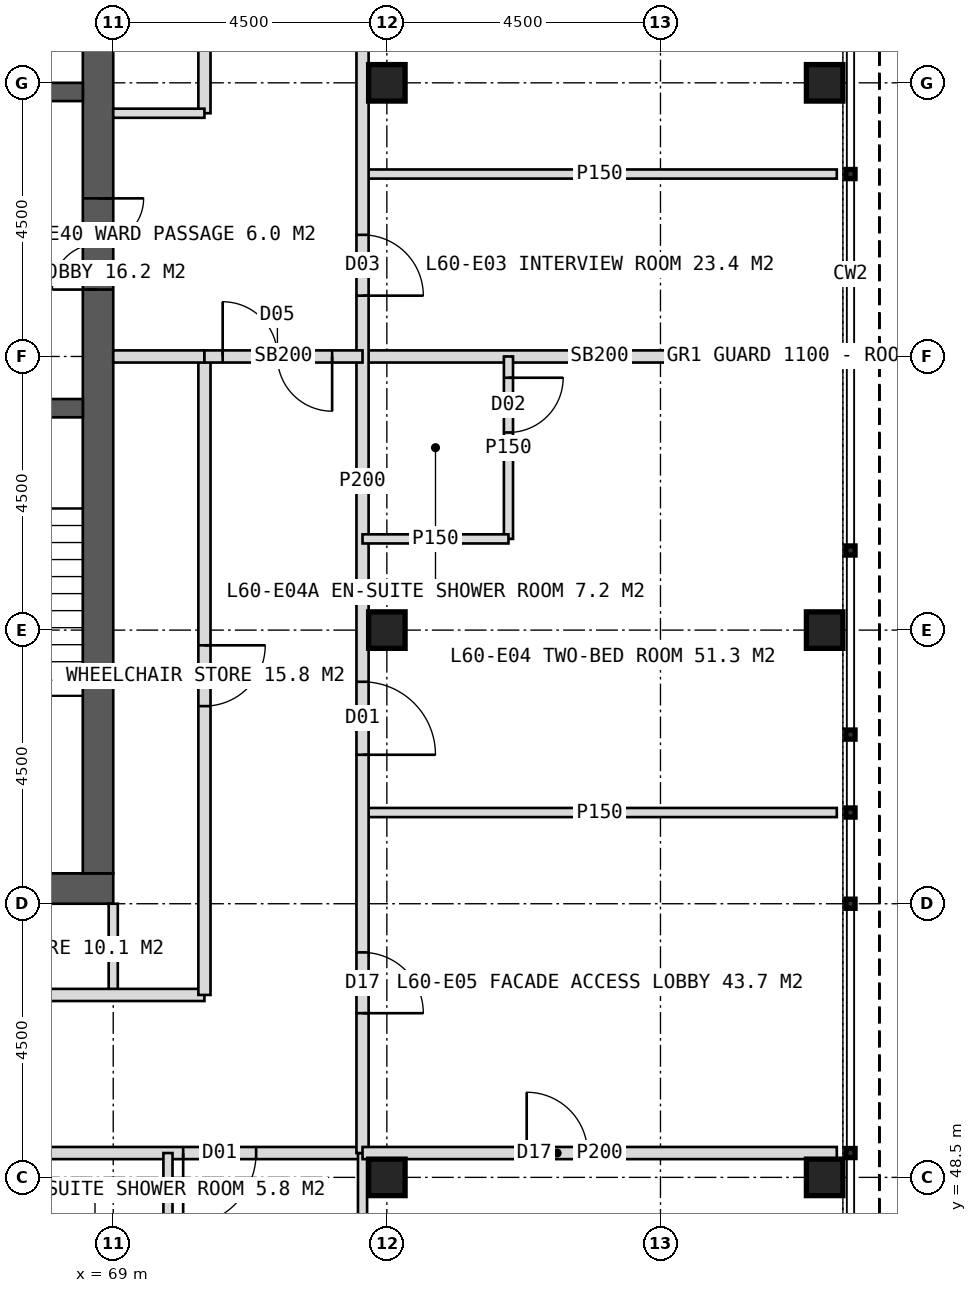
"""IFC4 building model, lengths in metres.
Left out: names, types, materials, properties, quantities, classifications, styles, units other than length and angle.
Written with IfcOpenShell. Run it as: python <this file> out.ifc"""

import sys

from ifc_helpers import new_model, si_unit, direction, frame, frame_2d, origin, origin_2d, place, context, subcontext, project, spatial, rectangle, hollow_rectangle, extrude, element, fill, save


model = new_model("IFC4")
c1 = context("Model", 3, precision=1e-05, world=origin(), true_north=direction((0.0, 1.0)))
c2 = subcontext(c1, "Body", "Model", "MODEL_VIEW")
j1 = project(units=[si_unit("LENGTHUNIT", "METRE"), si_unit("PLANEANGLEUNIT", "RADIAN")], contexts=[c1])
p1 = place(None, origin())
s1 = spatial("IfcSite", under=j1, at=p1, CompositionType="ELEMENT")
p2 = place(p1, origin())
s2 = spatial("IfcBuilding", under=s1, at=p2, CompositionType="ELEMENT")
p3 = place(p2, frame((0.0, 0.0, 250.0)))
s3 = spatial("IfcBuildingStorey", under=s2, at=p3, CompositionType="ELEMENT", Elevation=250.0)
p4 = place(p3, frame((51.0, 53.25, 0.0), z_axis=(0.0, 0.0, 1.0), x_axis=(1.0, 0.0, 0.0)))
e1 = element("IfcWall", 1, at=p4, inside=s3, PredefinedType="SHEAR", context=c2, shape_type="SweptSolid", body=[
    extrude(rectangle(XDim=18.0, YDim=0.5, at=frame_2d((9.0, 0.0))), origin(), (0.0, 0.0, 1.0), 4.0),
])
p5 = place(p4, frame((8.1, 0.0, 0.0)))
e2 = element("IfcOpeningElement", 2, at=p5, cuts=e1, PredefinedType="OPENING", context=c2, shape_type="SweptSolid", body=[
    extrude(rectangle(XDim=1.8, YDim=2.2, at=frame_2d((0.9, 1.1))), frame((0.0, 0.26, 0.0), z_axis=(0.0, -1.0, 0.0), x_axis=(1.0, 0.0, 0.0)), (0.0, 0.0, 1.0), 0.52),
])
p6 = place(p3, frame((68.75, 53.5, 0.0), z_axis=(0.0, 0.0, 1.0), x_axis=(0.0, 1.0, 0.0)))
e3 = element("IfcWall", 3, at=p6, inside=s3, PredefinedType="SHEAR", context=c2, shape_type="SweptSolid", body=[
    extrude(rectangle(XDim=17.0, YDim=0.5, at=frame_2d((8.5, 0.0))), origin(), (0.0, 0.0, 1.0), 4.0),
])
p7 = place(p6, frame((9.6, 0.0, 0.0)))
e4 = element("IfcOpeningElement", 4, at=p7, cuts=e3, PredefinedType="OPENING", context=c2, shape_type="SweptSolid", body=[
    extrude(rectangle(XDim=1.5, YDim=2.2, at=frame_2d((0.75, 1.1))), frame((0.0, 0.26, 0.0), z_axis=(0.0, -1.0, 0.0), x_axis=(1.0, 0.0, 0.0)), (0.0, 0.0, 1.0), 0.52),
])
p8 = place(p3, frame((65.2, 61.15, 0.0), z_axis=(0.0, 0.0, 1.0), x_axis=(1.0, 0.0, 0.0)))
e5 = element("IfcWall", 5, at=p8, inside=s3, PredefinedType="SHEAR", context=c2, shape_type="SweptSolid", body=[
    extrude(rectangle(XDim=3.3, YDim=0.3, at=frame_2d((1.65, 0.0))), origin(), (0.0, 0.0, 1.0), 4.0),
])
p9 = place(p8, frame((1.05, 0.0, 0.0)))
e6 = element("IfcOpeningElement", 6, at=p9, cuts=e5, PredefinedType="OPENING", context=c2, shape_type="SweptSolid", body=[
    extrude(rectangle(XDim=1.2, YDim=2.1, at=frame_2d((0.6, 1.05))), frame((0.0, 0.16, 0.0), z_axis=(0.0, -1.0, 0.0), x_axis=(1.0, 0.0, 0.0)), (0.0, 0.0, 1.0), 0.32),
])
p10 = place(p3, frame((65.2, 66.35, 0.0), z_axis=(0.0, 0.0, 1.0), x_axis=(1.0, 0.0, 0.0)))
e7 = element("IfcWall", 7, at=p10, inside=s3, PredefinedType="SHEAR", context=c2, shape_type="SweptSolid", body=[
    extrude(rectangle(XDim=3.3, YDim=0.3, at=frame_2d((1.65, 0.0))), origin(), (0.0, 0.0, 1.0), 4.0),
])
p11 = place(p10, frame((1.05, 0.0, 0.0)))
e8 = element("IfcOpeningElement", 8, at=p11, cuts=e7, PredefinedType="OPENING", context=c2, shape_type="SweptSolid", body=[
    extrude(rectangle(XDim=1.2, YDim=2.2, at=frame_2d((0.6, 1.1))), frame((0.0, 0.16, 0.0), z_axis=(0.0, -1.0, 0.0), x_axis=(1.0, 0.0, 0.0)), (0.0, 0.0, 1.0), 0.32),
])
for number, where, z_axis, x_axis in (
    (9, (73.5, 48.5, 0.0), (0.0, 0.0, 1.0), (1.0, 0.0, 0.0)),
    (10, (73.5, 57.5, 0.0), (0.0, 0.0, 1.0), (1.0, 0.0, 0.0)),
    (11, (73.5, 66.5, 0.0), (0.0, 0.0, 1.0), (1.0, 0.0, 0.0)),
    (12, (80.7, 48.5, 0.0), (0.0, 0.0, 1.0), (1.0, 0.0, 0.0)),
    (13, (80.7, 57.5, 0.0), (0.0, 0.0, 1.0), (1.0, 0.0, 0.0)),
    (14, (80.7, 66.5, 0.0), (0.0, 0.0, 1.0), (1.0, 0.0, 0.0)),
):
    element("IfcColumn", number, at=place(p3, frame(where, z_axis=z_axis, x_axis=x_axis)), inside=s3, PredefinedType="COLUMN", context=c2, shape_type="SweptSolid", body=[
        extrude(hollow_rectangle(XDim=0.6, YDim=0.6, WallThickness=0.04, at=origin_2d()), origin(), (0.0, 0.0, 1.0), 4.0),
    ])
p12 = place(p3, frame((73.1, 48.9, 0.0), z_axis=(0.0, 0.0, 1.0), x_axis=(-1.0, 0.0, 0.0)))
e15 = element("IfcWall", 15, at=p12, inside=s3, PredefinedType="PARTITIONING", context=c2, shape_type="SweptSolid", body=[
    extrude(rectangle(XDim=26.2, YDim=0.2, at=frame_2d((13.1, 0.0))), origin(), (0.0, 0.0, 1.0), 3.75),
])
p13 = place(p12, frame((1.75, 0.0, 0.0)))
e16 = element("IfcOpeningElement", 16, at=p13, cuts=e15, PredefinedType="OPENING", context=c2, shape_type="SweptSolid", body=[
    extrude(rectangle(XDim=1.2, YDim=2.2, at=frame_2d((0.6, 1.1))), frame((0.0, 0.11, 0.0), z_axis=(0.0, -1.0, 0.0), x_axis=(1.0, 0.0, 0.0)), (0.0, 0.0, 1.0), 0.22),
])
p14 = place(p12, frame((6.75, 0.0, 0.0)))
e17 = element("IfcOpeningElement", 17, at=p14, cuts=e15, PredefinedType="OPENING", context=c2, shape_type="SweptSolid", body=[
    extrude(rectangle(XDim=1.0, YDim=2.1, at=frame_2d((0.5, 1.05))), frame((0.0, 0.11, 0.0), z_axis=(0.0, -1.0, 0.0), x_axis=(1.0, 0.0, 0.0)), (0.0, 0.0, 1.0), 0.22),
])
p15 = place(p12, frame((11.1, 0.0, 0.0)))
e18 = element("IfcOpeningElement", 18, at=p15, cuts=e15, PredefinedType="OPENING", context=c2, shape_type="SweptSolid", body=[
    extrude(rectangle(XDim=1.0, YDim=2.1, at=frame_2d((0.5, 1.05))), frame((0.0, 0.11, 0.0), z_axis=(0.0, -1.0, 0.0), x_axis=(1.0, 0.0, 0.0)), (0.0, 0.0, 1.0), 0.22),
])
p16 = place(p12, frame((14.1, 0.0, 0.0)))
e19 = element("IfcOpeningElement", 19, at=p16, cuts=e15, PredefinedType="OPENING", context=c2, shape_type="SweptSolid", body=[
    extrude(rectangle(XDim=1.0, YDim=2.1, at=frame_2d((0.5, 1.05))), frame((0.0, 0.11, 0.0), z_axis=(0.0, -1.0, 0.0), x_axis=(1.0, 0.0, 0.0)), (0.0, 0.0, 1.0), 0.22),
])
p17 = place(p12, frame((18.45, 0.0, 0.0)))
e20 = element("IfcOpeningElement", 20, at=p17, cuts=e15, PredefinedType="OPENING", context=c2, shape_type="SweptSolid", body=[
    extrude(rectangle(XDim=1.0, YDim=2.1, at=frame_2d((0.5, 1.05))), frame((0.0, 0.11, 0.0), z_axis=(0.0, -1.0, 0.0), x_axis=(1.0, 0.0, 0.0)), (0.0, 0.0, 1.0), 0.22),
])
p18 = place(p12, frame((22.9, 0.0, 0.0)))
e21 = element("IfcOpeningElement", 21, at=p18, cuts=e15, PredefinedType="OPENING", context=c2, shape_type="SweptSolid", body=[
    extrude(rectangle(XDim=1.0, YDim=2.1, at=frame_2d((0.5, 1.05))), frame((0.0, 0.11, 0.0), z_axis=(0.0, -1.0, 0.0), x_axis=(1.0, 0.0, 0.0)), (0.0, 0.0, 1.0), 0.22),
])
p19 = place(p3, frame((73.1, 48.9, 0.0), z_axis=(0.0, 0.0, 1.0), x_axis=(0.0, -1.0, 0.0)))
e22 = element("IfcWall", 22, at=p19, inside=s3, PredefinedType="PARTITIONING", context=c2, shape_type="SweptSolid", body=[
    extrude(rectangle(XDim=7.8, YDim=0.15, at=frame_2d((3.9, 0.0))), origin(), (0.0, 0.0, 1.0), 3.75),
])
p20 = place(p3, frame((69.9, 48.9, 0.0), z_axis=(0.0, 0.0, 1.0), x_axis=(0.0, -1.0, 0.0)))
e23 = element("IfcWall", 23, at=p20, inside=s3, PredefinedType="PARTITIONING", context=c2, shape_type="SweptSolid", body=[
    extrude(rectangle(XDim=2.4, YDim=0.15, at=frame_2d((1.2, 0.0))), origin(), (0.0, 0.0, 1.0), 3.75),
])
p21 = place(p3, frame((69.0, 53.0, 0.0), z_axis=(0.0, 0.0, 1.0), x_axis=(0.0, -1.0, 0.0)))
e24 = element("IfcWall", 24, at=p21, inside=s3, PredefinedType="PARTITIONING", context=c2, shape_type="SweptSolid", body=[
    extrude(rectangle(XDim=1.5, YDim=0.15, at=frame_2d((0.75, 0.0))), origin(), (0.0, 0.0, 1.0), 3.75),
])
p22 = place(p3, frame((70.5, 51.5, 0.0), z_axis=(0.0, 0.0, 1.0), x_axis=(-1.0, 0.0, 0.0)))
e25 = element("IfcWall", 25, at=p22, inside=s3, PredefinedType="PARTITIONING", context=c2, shape_type="SweptSolid", body=[
    extrude(rectangle(XDim=8.25, YDim=0.2, at=frame_2d((4.125, 0.0))), origin(), (0.0, 0.0, 1.0), 3.75),
])
p23 = place(p22, frame((4.375, 0.0, 0.0)))
e26 = element("IfcOpeningElement", 26, at=p23, cuts=e25, PredefinedType="OPENING", context=c2, shape_type="SweptSolid", body=[
    extrude(rectangle(XDim=1.0, YDim=2.1, at=frame_2d((0.5, 1.05))), frame((0.0, 0.11, 0.0), z_axis=(0.0, -1.0, 0.0), x_axis=(1.0, 0.0, 0.0)), (0.0, 0.0, 1.0), 0.22),
])
p24 = place(p3, frame((73.1, 65.0, 0.0), z_axis=(0.0, 0.0, 1.0), x_axis=(1.0, 0.0, 0.0)))
e27 = element("IfcWall", 27, at=p24, inside=s3, PredefinedType="PARTITIONING", context=c2, shape_type="SweptSolid", body=[
    extrude(rectangle(XDim=7.8, YDim=0.15, at=frame_2d((3.9, 0.0))), origin(), (0.0, 0.0, 1.0), 3.75),
])
p25 = place(p3, frame((73.1, 62.0, 0.0), z_axis=(0.0, 0.0, 1.0), x_axis=(1.0, 0.0, 0.0)))
e28 = element("IfcWall", 28, at=p25, inside=s3, PredefinedType="SOLIDWALL", context=c2, shape_type="SweptSolid", body=[
    extrude(rectangle(XDim=7.8, YDim=0.2, at=frame_2d((3.9, 0.0))), origin(), (0.0, 0.0, 1.0), 2.75),
])
p26 = place(p3, frame((73.1, 54.5, 0.0), z_axis=(0.0, 0.0, 1.0), x_axis=(1.0, 0.0, 0.0)))
e29 = element("IfcWall", 29, at=p26, inside=s3, PredefinedType="PARTITIONING", context=c2, shape_type="SweptSolid", body=[
    extrude(rectangle(XDim=7.8, YDim=0.15, at=frame_2d((3.9, 0.0))), origin(), (0.0, 0.0, 1.0), 3.75),
])
p27 = place(p3, frame((73.1, 71.0, 0.0), z_axis=(0.0, 0.0, 1.0), x_axis=(0.0, -1.0, 0.0)))
e30 = element("IfcWall", 30, at=p27, inside=s3, PredefinedType="PARTITIONING", context=c2, shape_type="SweptSolid", body=[
    extrude(rectangle(XDim=22.1, YDim=0.2, at=frame_2d((11.05, 0.0))), origin(), (0.0, 0.0, 1.0), 3.75),
])
p28 = place(p27, frame((2.65, 0.0, 0.0)))
e31 = element("IfcOpeningElement", 31, at=p28, cuts=e30, PredefinedType="OPENING", context=c2, shape_type="SweptSolid", body=[
    extrude(rectangle(XDim=1.0, YDim=2.1, at=frame_2d((0.5, 1.05))), frame((0.0, 0.11, 0.0), z_axis=(0.0, -1.0, 0.0), x_axis=(1.0, 0.0, 0.0)), (0.0, 0.0, 1.0), 0.22),
])
p29 = place(p27, frame((7.0, 0.0, 0.0)))
e32 = element("IfcOpeningElement", 32, at=p29, cuts=e30, PredefinedType="OPENING", context=c2, shape_type="SweptSolid", body=[
    extrude(rectangle(XDim=1.0, YDim=2.1, at=frame_2d((0.5, 1.05))), frame((0.0, 0.11, 0.0), z_axis=(0.0, -1.0, 0.0), x_axis=(1.0, 0.0, 0.0)), (0.0, 0.0, 1.0), 0.22),
])
p30 = place(p27, frame((14.35, 0.0, 0.0)))
e33 = element("IfcOpeningElement", 33, at=p30, cuts=e30, PredefinedType="OPENING", context=c2, shape_type="SweptSolid", body=[
    extrude(rectangle(XDim=1.2, YDim=2.2, at=frame_2d((0.6, 1.1))), frame((0.0, 0.11, 0.0), z_axis=(0.0, -1.0, 0.0), x_axis=(1.0, 0.0, 0.0)), (0.0, 0.0, 1.0), 0.22),
])
p31 = place(p27, frame((18.8, 0.0, 0.0)))
e34 = element("IfcOpeningElement", 34, at=p31, cuts=e30, PredefinedType="OPENING", context=c2, shape_type="SweptSolid", body=[
    extrude(rectangle(XDim=1.0, YDim=2.1, at=frame_2d((0.5, 1.05))), frame((0.0, 0.11, 0.0), z_axis=(0.0, -1.0, 0.0), x_axis=(1.0, 0.0, 0.0)), (0.0, 0.0, 1.0), 0.22),
])
p32 = place(p3, frame((75.5, 62.0, 0.0), z_axis=(0.0, 0.0, 1.0), x_axis=(0.0, -1.0, 0.0)))
e35 = element("IfcWall", 35, at=p32, inside=s3, PredefinedType="PARTITIONING", context=c2, shape_type="SweptSolid", body=[
    extrude(rectangle(XDim=3.0, YDim=0.15, at=frame_2d((1.5, 0.0))), origin(), (0.0, 0.0, 1.0), 3.75),
])
p33 = place(p32, frame((0.35, 0.0, 0.0)))
e36 = element("IfcOpeningElement", 36, at=p33, cuts=e35, PredefinedType="OPENING", context=c2, shape_type="SweptSolid", body=[
    extrude(rectangle(XDim=0.9, YDim=2.1, at=frame_2d((0.45, 1.05))), frame((0.0, 0.085, 0.0), z_axis=(0.0, -1.0, 0.0), x_axis=(1.0, 0.0, 0.0)), (0.0, 0.0, 1.0), 0.17),
])
p34 = place(p3, frame((73.1, 59.0, 0.0), z_axis=(0.0, 0.0, 1.0), x_axis=(1.0, 0.0, 0.0)))
e37 = element("IfcWall", 37, at=p34, inside=s3, PredefinedType="PARTITIONING", context=c2, shape_type="SweptSolid", body=[
    extrude(rectangle(XDim=2.4, YDim=0.15, at=frame_2d((1.2, 0.0))), origin(), (0.0, 0.0, 1.0), 3.75),
])
p35 = place(p3, frame((73.1, 48.9, 0.0), z_axis=(0.0, 0.0, 1.0), x_axis=(1.0, 0.0, 0.0)))
e38 = element("IfcWall", 38, at=p35, inside=s3, PredefinedType="PARTITIONING", context=c2, shape_type="SweptSolid", body=[
    extrude(rectangle(XDim=7.8, YDim=0.2, at=frame_2d((3.9, 0.0))), origin(), (0.0, 0.0, 1.0), 3.75),
])
p36 = place(p35, frame((2.7, 0.0, 0.0)))
e39 = element("IfcOpeningElement", 39, at=p36, cuts=e38, PredefinedType="OPENING", context=c2, shape_type="SweptSolid", body=[
    extrude(rectangle(XDim=1.0, YDim=2.1, at=frame_2d((0.5, 1.05))), frame((0.0, 0.11, 0.0), z_axis=(0.0, -1.0, 0.0), x_axis=(1.0, 0.0, 0.0)), (0.0, 0.0, 1.0), 0.22),
])
p37 = place(p3, frame((70.5, 72.5, 0.0), z_axis=(0.0, 0.0, 1.0), x_axis=(0.0, -1.0, 0.0)))
e40 = element("IfcWall", 40, at=p37, inside=s3, PredefinedType="PARTITIONING", context=c2, shape_type="SweptSolid", body=[
    extrude(rectangle(XDim=6.5, YDim=0.2, at=frame_2d((3.25, 0.0))), origin(), (0.0, 0.0, 1.0), 3.75),
])
p38 = place(p37, frame((3.5, 0.0, 0.0)))
e41 = element("IfcOpeningElement", 41, at=p38, cuts=e40, PredefinedType="OPENING", context=c2, shape_type="SweptSolid", body=[
    extrude(rectangle(XDim=1.0, YDim=2.1, at=frame_2d((0.5, 1.05))), frame((0.0, 0.11, 0.0), z_axis=(0.0, -1.0, 0.0), x_axis=(1.0, 0.0, 0.0)), (0.0, 0.0, 1.0), 0.22),
])
p39 = place(p3, frame((70.5, 62.0, 0.0), z_axis=(0.0, 0.0, 1.0), x_axis=(0.0, -1.0, 0.0)))
e42 = element("IfcWall", 42, at=p39, inside=s3, PredefinedType="PARTITIONING", context=c2, shape_type="SweptSolid", body=[
    extrude(rectangle(XDim=10.5, YDim=0.2, at=frame_2d((5.25, 0.0))), origin(), (0.0, 0.0, 1.0), 3.75),
])
p40 = place(p39, frame((4.75, 0.0, 0.0)))
e43 = element("IfcOpeningElement", 43, at=p40, cuts=e42, PredefinedType="OPENING", context=c2, shape_type="SweptSolid", body=[
    extrude(rectangle(XDim=1.0, YDim=2.1, at=frame_2d((0.5, 1.05))), frame((0.0, 0.11, 0.0), z_axis=(0.0, -1.0, 0.0), x_axis=(1.0, 0.0, 0.0)), (0.0, 0.0, 1.0), 0.22),
])
p41 = place(p3, frame((69.0, 66.0, 0.0), z_axis=(0.0, 0.0, 1.0), x_axis=(1.0, 0.0, 0.0)))
e44 = element("IfcWall", 44, at=p41, inside=s3, PredefinedType="PARTITIONING", context=c2, shape_type="SweptSolid", body=[
    extrude(rectangle(XDim=1.5, YDim=0.15, at=frame_2d((0.75, 0.0))), origin(), (0.0, 0.0, 1.0), 3.75),
])
p42 = place(p3, frame((69.0, 62.0, 0.0), z_axis=(0.0, 0.0, 1.0), x_axis=(1.0, 0.0, 0.0)))
e45 = element("IfcWall", 45, at=p42, inside=s3, PredefinedType="SOLIDWALL", context=c2, shape_type="SweptSolid", body=[
    extrude(rectangle(XDim=1.5, YDim=0.2, at=frame_2d((0.75, 0.0))), origin(), (0.0, 0.0, 1.0), 2.75),
])
p43 = place(p3, frame((70.5, 62.0, 0.0), z_axis=(0.0, 0.0, 1.0), x_axis=(1.0, 0.0, 0.0)))
e46 = element("IfcWall", 46, at=p43, inside=s3, PredefinedType="SOLIDWALL", context=c2, shape_type="SweptSolid", body=[
    extrude(rectangle(XDim=2.6, YDim=0.2, at=frame_2d((1.3, 0.0))), origin(), (0.0, 0.0, 1.0), 2.75),
])
p44 = place(p43, frame((0.3, 0.0, 0.0)))
e47 = element("IfcOpeningElement", 47, at=p44, cuts=e46, PredefinedType="OPENING", context=c2, shape_type="SweptSolid", body=[
    extrude(rectangle(XDim=1.8, YDim=2.2, at=frame_2d((0.9, 1.1))), frame((0.0, 0.11, 0.0), z_axis=(0.0, -1.0, 0.0), x_axis=(1.0, 0.0, 0.0)), (0.0, 0.0, 1.0), 0.22),
])
p45 = place(p13, origin())
e48 = element("IfcDoor", 48, at=p45, inside=s3, OperationType="SINGLE_SWING_RIGHT", PredefinedType="DOOR", context=c2, shape_type="SweptSolid", body=[
    extrude(rectangle(XDim=1.2, YDim=2.2, at=frame_2d((0.6, 1.1))), frame((0.0, 0.025, 0.0), z_axis=(0.0, -1.0, 0.0), x_axis=(1.0, 0.0, 0.0)), (0.0, 0.0, 1.0), 0.05),
])
fill(e16, e48)
p46 = place(p29, origin())
e49 = element("IfcDoor", 49, at=p46, inside=s3, OperationType="SINGLE_SWING_RIGHT", PredefinedType="DOOR", context=c2, shape_type="SweptSolid", body=[
    extrude(rectangle(XDim=1.0, YDim=2.1, at=frame_2d((0.5, 1.05))), frame((0.0, 0.025, 0.0), z_axis=(0.0, -1.0, 0.0), x_axis=(1.0, 0.0, 0.0)), (0.0, 0.0, 1.0), 0.05),
])
fill(e32, e49)
p47 = place(p30, origin())
e50 = element("IfcDoor", 50, at=p47, inside=s3, OperationType="SINGLE_SWING_RIGHT", PredefinedType="DOOR", context=c2, shape_type="SweptSolid", body=[
    extrude(rectangle(XDim=1.2, YDim=2.2, at=frame_2d((0.6, 1.1))), frame((0.0, 0.025, 0.0), z_axis=(0.0, -1.0, 0.0), x_axis=(1.0, 0.0, 0.0)), (0.0, 0.0, 1.0), 0.05),
])
fill(e33, e50)
p48 = place(p33, origin())
e51 = element("IfcDoor", 51, at=p48, inside=s3, OperationType="SINGLE_SWING_LEFT", PredefinedType="DOOR", context=c2, shape_type="SweptSolid", body=[
    extrude(rectangle(XDim=0.9, YDim=2.1, at=frame_2d((0.45, 1.05))), frame((0.0, 0.025, 0.0), z_axis=(0.0, -1.0, 0.0), x_axis=(1.0, 0.0, 0.0)), (0.0, 0.0, 1.0), 0.05),
])
fill(e36, e51)
p49 = place(p36, origin())
e52 = element("IfcDoor", 52, at=p49, inside=s3, OperationType="SINGLE_SWING_LEFT", PredefinedType="DOOR", context=c2, shape_type="SweptSolid", body=[
    extrude(rectangle(XDim=1.0, YDim=2.1, at=frame_2d((0.5, 1.05))), frame((0.0, 0.025, 0.0), z_axis=(0.0, -1.0, 0.0), x_axis=(1.0, 0.0, 0.0)), (0.0, 0.0, 1.0), 0.05),
])
fill(e39, e52)
p50 = place(p31, origin())
e53 = element("IfcDoor", 53, at=p50, inside=s3, OperationType="SINGLE_SWING_RIGHT", PredefinedType="DOOR", context=c2, shape_type="SweptSolid", body=[
    extrude(rectangle(XDim=1.0, YDim=2.1, at=frame_2d((0.5, 1.05))), frame((0.0, 0.025, 0.0), z_axis=(0.0, -1.0, 0.0), x_axis=(1.0, 0.0, 0.0)), (0.0, 0.0, 1.0), 0.05),
])
fill(e34, e53)
p51 = place(p40, origin())
e54 = element("IfcDoor", 54, at=p51, inside=s3, OperationType="SINGLE_SWING_LEFT", PredefinedType="DOOR", context=c2, shape_type="SweptSolid", body=[
    extrude(rectangle(XDim=1.0, YDim=2.1, at=frame_2d((0.5, 1.05))), frame((0.0, 0.025, 0.0), z_axis=(0.0, -1.0, 0.0), x_axis=(1.0, 0.0, 0.0)), (0.0, 0.0, 1.0), 0.05),
])
fill(e43, e54)
p52 = place(p44, origin())
e55 = element("IfcDoor", 55, at=p52, inside=s3, OperationType="DOUBLE_DOOR_DOUBLE_SWING", PredefinedType="DOOR", context=c2, shape_type="SweptSolid", body=[
    extrude(rectangle(XDim=1.8, YDim=2.2, at=frame_2d((0.9, 1.1))), frame((0.0, 0.025, 0.0), z_axis=(0.0, -1.0, 0.0), x_axis=(1.0, 0.0, 0.0)), (0.0, 0.0, 1.0), 0.05),
])
fill(e47, e55)
p53 = place(p7, origin())
e56 = element("IfcDoor", 56, at=p53, inside=s3, OperationType="DOUBLE_DOOR_SINGLE_SWING", PredefinedType="DOOR", context=c2, shape_type="SweptSolid", body=[
    extrude(rectangle(XDim=1.5, YDim=2.2, at=frame_2d((0.75, 1.1))), frame((0.0, 0.025, 0.0), z_axis=(0.0, -1.0, 0.0), x_axis=(1.0, 0.0, 0.0)), (0.0, 0.0, 1.0), 0.05),
])
fill(e4, e56)
save(model, sys.argv[1])
